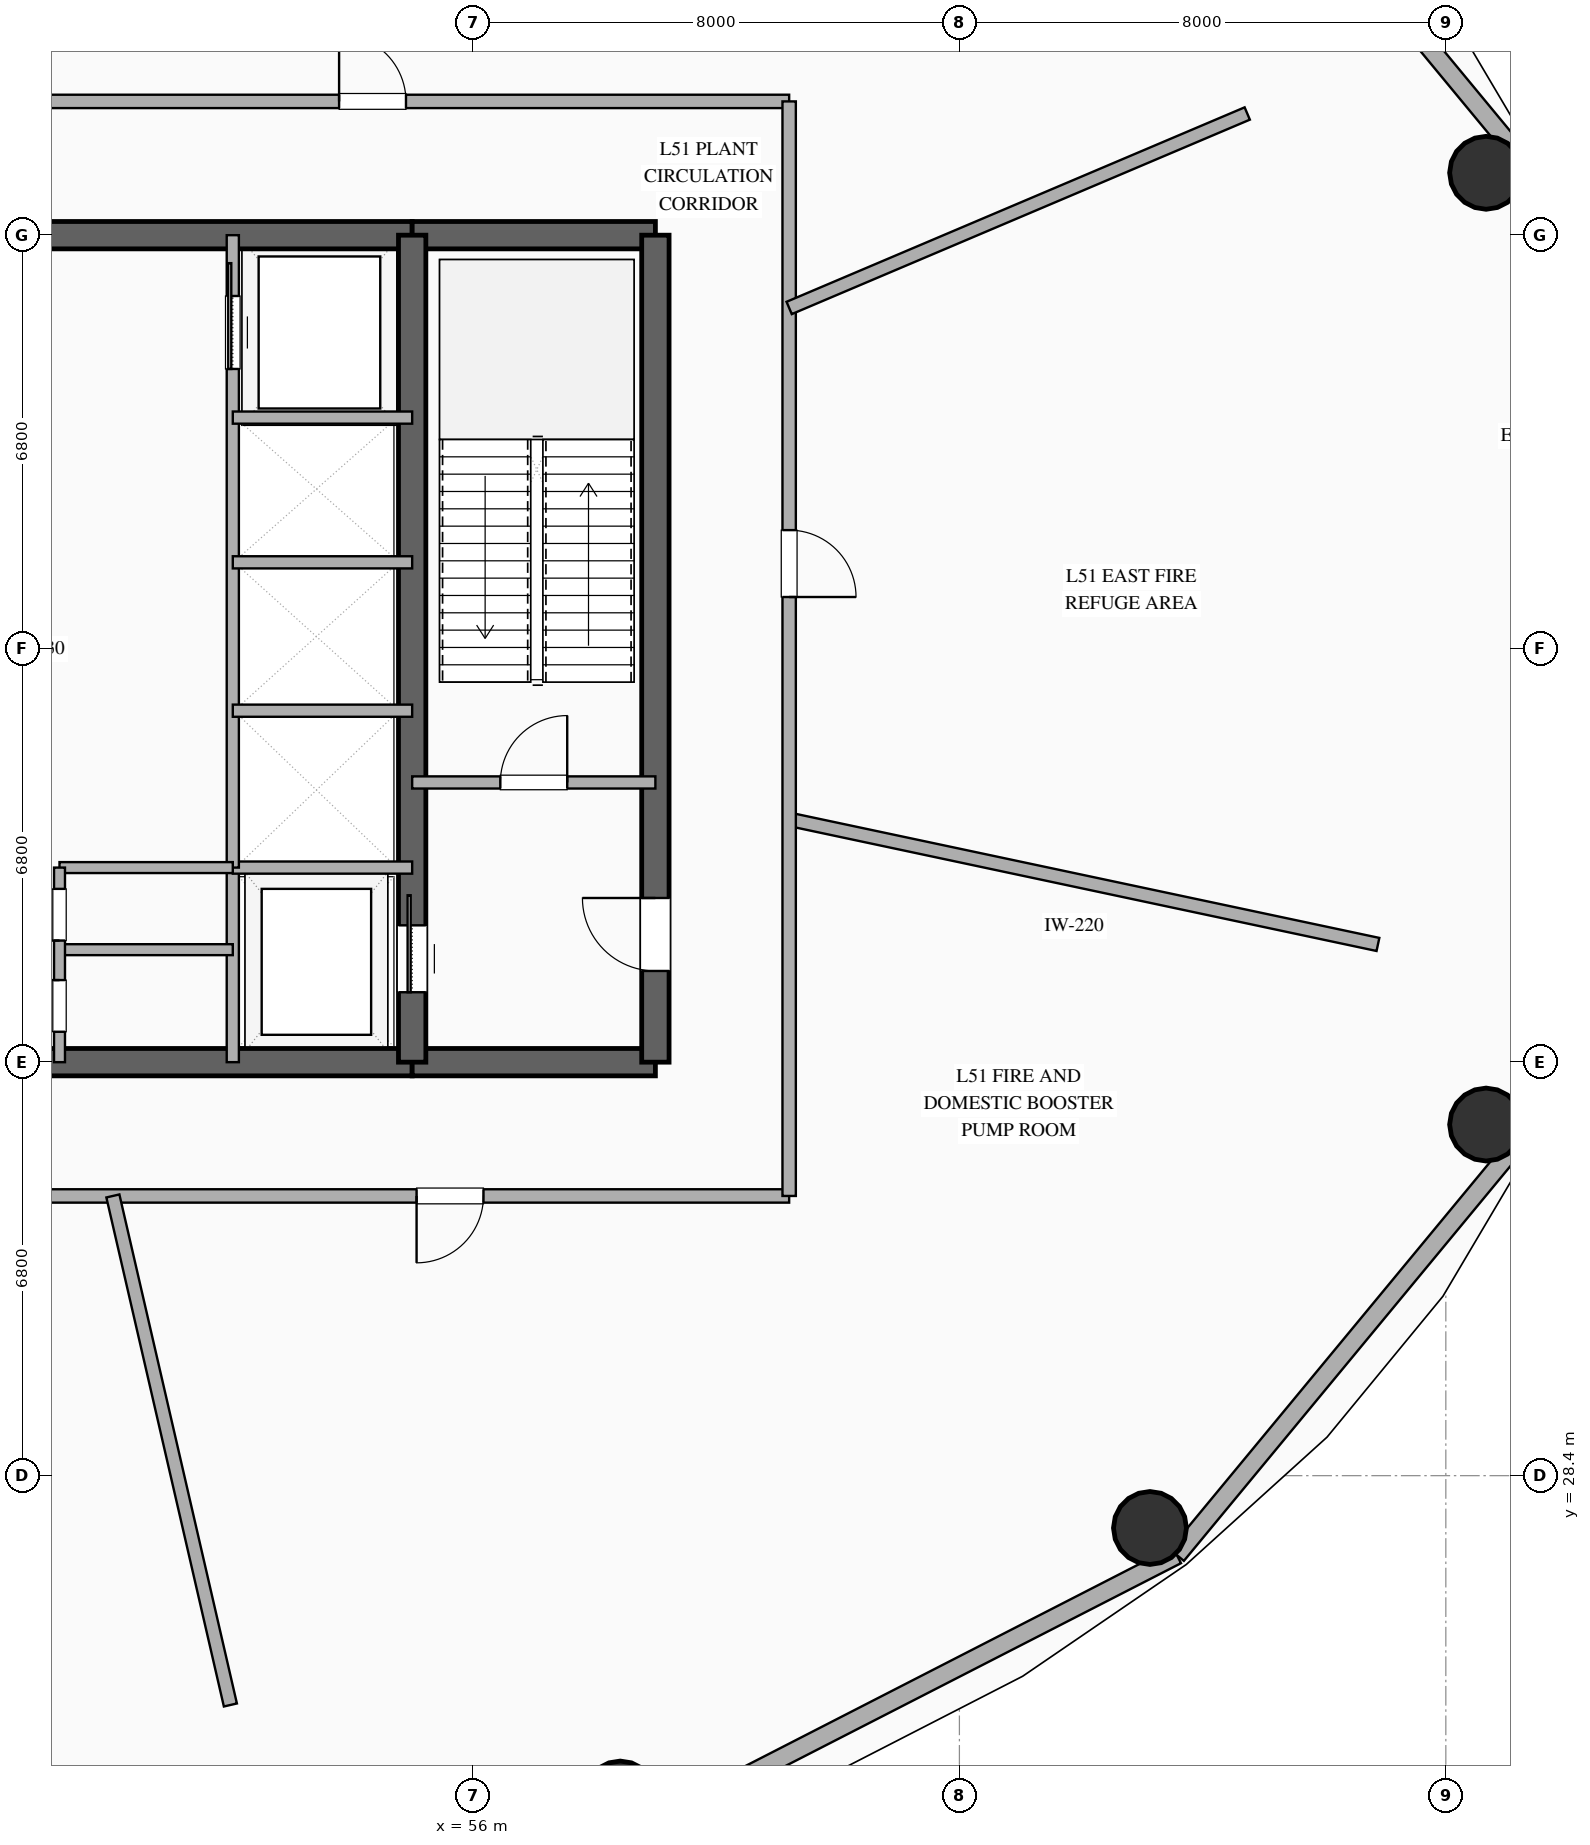
"""IFC4 building model, lengths in metres.
Left out: names, types, materials, properties, quantities, classifications, styles, units other than length and angle.
Written with IfcOpenShell. Run it as: python <this file> out.ifc"""

import sys

from ifc_helpers import new_model, si_unit, direction, frame, frame_2d, origin, origin_2d, place, context, subcontext, project, spatial, rectangle, hollow_circle, extrude, element, fill, save


model = new_model("IFC4")
c1 = context("Model", 3, precision=1e-05, world=origin(), true_north=direction((0.0, 1.0)))
c2 = subcontext(c1, "Body", "Model", "MODEL_VIEW")
j1 = project(units=[si_unit("LENGTHUNIT", "METRE"), si_unit("PLANEANGLEUNIT", "RADIAN")], contexts=[c1])
p1 = place(None, origin())
s1 = spatial("IfcSite", under=j1, at=p1, CompositionType="ELEMENT")
p2 = place(p1, origin())
s2 = spatial("IfcBuilding", under=s1, at=p2, CompositionType="ELEMENT")
p3 = place(p2, frame((0.0, 0.0, 201.0)))
s3 = spatial("IfcBuildingStorey", under=s2, at=p3, CompositionType="ELEMENT", Elevation=201.0)
p4 = place(p3, frame((41.0, 35.2, 0.0), z_axis=(0.0, 0.0, 1.0), x_axis=(1.0, 0.0, 0.0)))
e1 = element("IfcWall", 1, at=p4, inside=s3, PredefinedType="SHEAR", context=c2, shape_type="SweptSolid", body=[
    extrude(rectangle(XDim=14.0, YDim=0.45, at=frame_2d((7.0, 0.0))), origin(), (0.0, 0.0, 1.0), 5.15),
])
p5 = place(p4, frame((6.1, 0.0, 0.0)))
e2 = element("IfcOpeningElement", 2, at=p5, cuts=e1, PredefinedType="OPENING", context=c2, shape_type="SweptSolid", body=[
    extrude(rectangle(XDim=1.8, YDim=2.25, at=frame_2d((0.9, 1.125))), frame((0.0, 0.235, 0.0), z_axis=(0.0, -1.0, 0.0), x_axis=(1.0, 0.0, 0.0)), (0.0, 0.0, 1.0), 0.47),
])
p6 = place(p3, frame((55.0, 35.2, 0.0), z_axis=(0.0, 0.0, 1.0), x_axis=(1.0, 0.0, 0.0)))
e3 = element("IfcWall", 3, at=p6, inside=s3, PredefinedType="SHEAR", context=c2, shape_type="SweptSolid", body=[
    extrude(rectangle(XDim=4.0, YDim=0.45, at=frame_2d((2.0, 0.0))), origin(), (0.0, 0.0, 1.0), 5.15),
])
p7 = place(p3, frame((41.0, 48.8, 0.0), z_axis=(0.0, 0.0, 1.0), x_axis=(1.0, 0.0, 0.0)))
e4 = element("IfcWall", 4, at=p7, inside=s3, PredefinedType="SHEAR", context=c2, shape_type="SweptSolid", body=[
    extrude(rectangle(XDim=14.0, YDim=0.45, at=frame_2d((7.0, 0.0))), origin(), (0.0, 0.0, 1.0), 5.15),
])
p8 = place(p7, frame((6.1, 0.0, 0.0)))
e5 = element("IfcOpeningElement", 5, at=p8, cuts=e4, PredefinedType="OPENING", context=c2, shape_type="SweptSolid", body=[
    extrude(rectangle(XDim=1.8, YDim=2.25, at=frame_2d((0.9, 1.125))), frame((0.0, 0.235, 0.0), z_axis=(0.0, -1.0, 0.0), x_axis=(1.0, 0.0, 0.0)), (0.0, 0.0, 1.0), 0.47),
])
p9 = place(p3, frame((55.0, 48.8, 0.0), z_axis=(0.0, 0.0, 1.0), x_axis=(1.0, 0.0, 0.0)))
e6 = element("IfcWall", 6, at=p9, inside=s3, PredefinedType="SHEAR", context=c2, shape_type="SweptSolid", body=[
    extrude(rectangle(XDim=4.0, YDim=0.45, at=frame_2d((2.0, 0.0))), origin(), (0.0, 0.0, 1.0), 5.15),
])
p10 = place(p3, frame((59.0, 35.2, 0.0), z_axis=(0.0, 0.0, 1.0), x_axis=(0.0, 1.0, 0.0)))
e7 = element("IfcWall", 7, at=p10, inside=s3, PredefinedType="SHEAR", context=c2, shape_type="SweptSolid", body=[
    extrude(rectangle(XDim=13.6, YDim=0.45, at=frame_2d((6.8, 0.0))), origin(), (0.0, 0.0, 1.0), 5.15),
])
p11 = place(p10, frame((1.5, 0.0, 0.0)))
e8 = element("IfcOpeningElement", 8, at=p11, cuts=e7, PredefinedType="OPENING", context=c2, shape_type="SweptSolid", body=[
    extrude(rectangle(XDim=1.2, YDim=2.15, at=frame_2d((0.6, 1.075))), frame((0.0, 0.235, 0.0), z_axis=(0.0, -1.0, 0.0), x_axis=(1.0, 0.0, 0.0)), (0.0, 0.0, 1.0), 0.47),
])
p12 = place(p3, frame((55.0, 35.2, 0.0), z_axis=(0.0, 0.0, 1.0), x_axis=(0.0, 1.0, 0.0)))
e9 = element("IfcWall", 9, at=p12, inside=s3, PredefinedType="SHEAR", context=c2, shape_type="SweptSolid", body=[
    extrude(rectangle(XDim=13.6, YDim=0.45, at=frame_2d((6.8, 0.0))), origin(), (0.0, 0.0, 1.0), 5.15),
])
p13 = place(p12, frame((1.15, 0.0, 0.0)))
e10 = element("IfcOpeningElement", 10, at=p13, cuts=e9, PredefinedType="OPENING", context=c2, shape_type="SweptSolid", body=[
    extrude(rectangle(XDim=1.1, YDim=2.2, at=frame_2d((0.55, 1.1))), frame((0.0, 0.235, 0.0), z_axis=(0.0, -1.0, 0.0), x_axis=(1.0, 0.0, 0.0)), (0.0, 0.0, 1.0), 0.47),
])
for number, where, z_axis, x_axis in (
    (11, (72.662, 49.826, 0.0), (0.0, 0.0, 1.0), (1.0, 0.0, 0.0)),
    (12, (58.422, 23.107, 0.0), (0.0, 0.0, 1.0), (1.0, 0.0, 0.0)),
    (13, (67.134, 27.54, 0.0), (0.0, 0.0, 1.0), (1.0, 0.0, 0.0)),
    (14, (72.662, 34.174, 0.0), (0.0, 0.0, 1.0), (1.0, 0.0, 0.0)),
):
    element("IfcColumn", number, at=place(p3, frame(where, z_axis=z_axis, x_axis=x_axis)), inside=s3, PredefinedType="COLUMN", context=c2, shape_type="SweptSolid", body=[
        extrude(hollow_circle(Radius=0.6, WallThickness=0.032, at=origin_2d()), origin(), (0.0, 0.0, 1.0), 5.15),
    ])
p14 = place(p3, frame((73.232, 50.067, 0.0), z_axis=(0.0, 0.0, 1.0), x_axis=(-0.637333477683, 0.770588111915, 0.0)))
e15 = element("IfcWall", 15, at=p14, inside=s3, PredefinedType="SOLIDWALL", context=c2, shape_type="SweptSolid", body=[
    extrude(rectangle(XDim=8.875, YDim=0.3, at=frame_2d((4.438, 0.0))), origin(), (0.0, 0.0, 1.0), 5.15),
])
p15 = place(p3, frame((58.663, 22.525, 0.0), z_axis=(0.0, 0.0, 1.0), x_axis=(0.889872523182, 0.456209263919, 0.0)))
e16 = element("IfcWall", 16, at=p15, inside=s3, PredefinedType="SOLIDWALL", context=c2, shape_type="SweptSolid", body=[
    extrude(rectangle(XDim=10.016, YDim=0.3, at=frame_2d((5.008, 0.0))), origin(), (0.0, 0.0, 1.0), 5.15),
])
p16 = place(p3, frame((67.576, 27.094, 0.0), z_axis=(0.0, 0.0, 1.0), x_axis=(0.637333477683, 0.770588111915, 0.0)))
e17 = element("IfcWall", 17, at=p16, inside=s3, PredefinedType="SOLIDWALL", context=c2, shape_type="SweptSolid", body=[
    extrude(rectangle(XDim=8.875, YDim=0.3, at=frame_2d((4.438, 0.0))), origin(), (0.0, 0.0, 1.0), 5.15),
])
p17 = place(p3, frame((55.0, 39.8, 0.0), z_axis=(0.0, 0.0, 1.0), x_axis=(1.0, 0.0, 0.0)))
e18 = element("IfcWall", 18, at=p17, inside=s3, PredefinedType="SOLIDWALL", context=c2, shape_type="SweptSolid", body=[
    extrude(rectangle(XDim=4.0, YDim=0.2, at=frame_2d((2.0, 0.0))), origin(), (0.0, 0.0, 1.0), 3.45),
])
p18 = place(p17, frame((1.45, 0.0, 0.0)))
e19 = element("IfcOpeningElement", 19, at=p18, cuts=e18, PredefinedType="OPENING", context=c2, shape_type="SweptSolid", body=[
    extrude(rectangle(XDim=1.1, YDim=2.15, at=frame_2d((0.55, 1.075))), frame((0.0, 0.11, 0.0), z_axis=(0.0, -1.0, 0.0), x_axis=(1.0, 0.0, 0.0)), (0.0, 0.0, 1.0), 0.22),
])
p19 = place(p3, frame((52.05, 35.2, 0.0), z_axis=(0.0, 0.0, 1.0), x_axis=(0.0, 1.0, 0.0)))
e20 = element("IfcWall", 20, at=p19, inside=s3, PredefinedType="SOLIDWALL", context=c2, shape_type="SweptSolid", body=[
    extrude(rectangle(XDim=3.2, YDim=0.2, at=frame_2d((1.6, 0.0))), origin(), (0.0, 0.0, 1.0), 3.45),
])
p20 = place(p3, frame((52.05, 38.4, 0.0), z_axis=(0.0, 0.0, 1.0), x_axis=(1.0, 0.0, 0.0)))
e21 = element("IfcWall", 21, at=p20, inside=s3, PredefinedType="SOLIDWALL", context=c2, shape_type="SweptSolid", body=[
    extrude(rectangle(XDim=2.95, YDim=0.2, at=frame_2d((1.475, 0.0))), origin(), (0.0, 0.0, 1.0), 3.45),
])
p21 = place(p3, frame((52.05, 38.4, 0.0), z_axis=(0.0, 0.0, 1.0), x_axis=(0.0, 1.0, 0.0)))
e22 = element("IfcWall", 22, at=p21, inside=s3, PredefinedType="SOLIDWALL", context=c2, shape_type="SweptSolid", body=[
    extrude(rectangle(XDim=10.4, YDim=0.2, at=frame_2d((5.2, 0.0))), origin(), (0.0, 0.0, 1.0), 3.45),
])
p22 = place(p21, frame((8.2, 0.0, 0.0)))
e23 = element("IfcOpeningElement", 23, at=p22, cuts=e22, PredefinedType="OPENING", context=c2, shape_type="SweptSolid", body=[
    extrude(rectangle(XDim=1.2, YDim=2.2, at=frame_2d((0.6, 1.1))), frame((0.0, 0.11, 0.0), z_axis=(0.0, -1.0, 0.0), x_axis=(1.0, 0.0, 0.0)), (0.0, 0.0, 1.0), 0.22),
])
for number, where, z_axis, x_axis in (
    (24, (52.05, 40.98, 0.0), (0.0, 0.0, 1.0), (1.0, 0.0, 0.0)),
    (25, (52.05, 43.42, 0.0), (0.0, 0.0, 1.0), (1.0, 0.0, 0.0)),
    (26, (52.05, 45.8, 0.0), (0.0, 0.0, 1.0), (1.0, 0.0, 0.0)),
):
    element("IfcWall", number, at=place(p3, frame(where, z_axis=z_axis, x_axis=x_axis)), inside=s3, PredefinedType="SOLIDWALL", context=c2, shape_type="SweptSolid", body=[
        extrude(rectangle(XDim=2.95, YDim=0.2, at=frame_2d((1.475, 0.0))), origin(), (0.0, 0.0, 1.0), 3.45),
    ])
for number, where, z_axis, x_axis in (
    (27, (49.2, 37.05, 0.0), (0.0, 0.0, 1.0), (1.0, 0.0, 0.0)),
    (28, (49.2, 38.4, 0.0), (0.0, 0.0, 1.0), (1.0, 0.0, 0.0)),
):
    element("IfcWall", number, at=place(p3, frame(where, z_axis=z_axis, x_axis=x_axis)), inside=s3, PredefinedType="PLUMBINGWALL", context=c2, shape_type="SweptSolid", body=[
        extrude(rectangle(XDim=2.85, YDim=0.18, at=frame_2d((1.425, 0.0))), origin(), (0.0, 0.0, 1.0), 3.45),
    ])
p23 = place(p3, frame((49.2, 35.2, 0.0), z_axis=(0.0, 0.0, 1.0), x_axis=(0.0, 1.0, 0.0)))
e29 = element("IfcWall", 29, at=p23, inside=s3, PredefinedType="PLUMBINGWALL", context=c2, shape_type="SweptSolid", body=[
    extrude(rectangle(XDim=3.2, YDim=0.18, at=frame_2d((1.6, 0.0))), origin(), (0.0, 0.0, 1.0), 3.45),
])
p24 = place(p23, frame((0.5, 0.0, 0.0)))
e30 = element("IfcOpeningElement", 30, at=p24, cuts=e29, PredefinedType="OPENING", context=c2, shape_type="SweptSolid", body=[
    extrude(rectangle(XDim=0.85, YDim=2.1, at=frame_2d((0.425, 1.05))), frame((0.0, 0.1, 0.0), z_axis=(0.0, -1.0, 0.0), x_axis=(1.0, 0.0, 0.0)), (0.0, 0.0, 1.0), 0.2),
])
p25 = place(p23, frame((2.0, 0.0, 0.0)))
e31 = element("IfcOpeningElement", 31, at=p25, cuts=e29, PredefinedType="OPENING", context=c2, shape_type="SweptSolid", body=[
    extrude(rectangle(XDim=0.85, YDim=2.15, at=frame_2d((0.425, 1.075))), frame((0.0, 0.1, 0.0), z_axis=(0.0, -1.0, 0.0), x_axis=(1.0, 0.0, 0.0)), (0.0, 0.0, 1.0), 0.2),
])
p26 = place(p3, frame((61.2, 33.0, 0.0), z_axis=(0.0, 0.0, 1.0), x_axis=(-1.0, 0.0, 0.0)))
e32 = element("IfcWall", 32, at=p26, inside=s3, PredefinedType="SOLIDWALL", context=c2, shape_type="SweptSolid", body=[
    extrude(rectangle(XDim=26.4, YDim=0.22, at=frame_2d((13.2, 0.0))), origin(), (0.0, 0.0, 1.0), 3.45),
])
p27 = place(p26, frame((18.195, 0.0, 0.0)))
e33 = element("IfcOpeningElement", 33, at=p27, cuts=e32, PredefinedType="OPENING", context=c2, shape_type="SweptSolid", body=[
    extrude(rectangle(XDim=1.1, YDim=2.15, at=frame_2d((0.55, 1.075))), frame((0.0, 0.12, 0.0), z_axis=(0.0, -1.0, 0.0), x_axis=(1.0, 0.0, 0.0)), (0.0, 0.0, 1.0), 0.24),
])
p28 = place(p26, frame((5.028, 0.0, 0.0)))
e34 = element("IfcOpeningElement", 34, at=p28, cuts=e32, PredefinedType="OPENING", context=c2, shape_type="SweptSolid", body=[
    extrude(rectangle(XDim=1.1, YDim=2.15, at=frame_2d((0.55, 1.075))), frame((0.0, 0.12, 0.0), z_axis=(0.0, -1.0, 0.0), x_axis=(1.0, 0.0, 0.0)), (0.0, 0.0, 1.0), 0.24),
])
p29 = place(p3, frame((34.8, 51.0, 0.0), z_axis=(0.0, 0.0, 1.0), x_axis=(1.0, 0.0, 0.0)))
e35 = element("IfcWall", 35, at=p29, inside=s3, PredefinedType="SOLIDWALL", context=c2, shape_type="SweptSolid", body=[
    extrude(rectangle(XDim=26.4, YDim=0.22, at=frame_2d((13.2, 0.0))), origin(), (0.0, 0.0, 1.0), 3.45),
])
p30 = place(p29, frame((18.998, 0.0, 0.0)))
e36 = element("IfcOpeningElement", 36, at=p30, cuts=e35, PredefinedType="OPENING", context=c2, shape_type="SweptSolid", body=[
    extrude(rectangle(XDim=1.1, YDim=2.15, at=frame_2d((0.55, 1.075))), frame((0.0, 0.12, 0.0), z_axis=(0.0, -1.0, 0.0), x_axis=(1.0, 0.0, 0.0)), (0.0, 0.0, 1.0), 0.24),
])
p31 = place(p29, frame((5.83, 0.0, 0.0)))
e37 = element("IfcOpeningElement", 37, at=p31, cuts=e35, PredefinedType="OPENING", context=c2, shape_type="SweptSolid", body=[
    extrude(rectangle(XDim=1.1, YDim=2.15, at=frame_2d((0.55, 1.075))), frame((0.0, 0.12, 0.0), z_axis=(0.0, -1.0, 0.0), x_axis=(1.0, 0.0, 0.0)), (0.0, 0.0, 1.0), 0.24),
])
p32 = place(p3, frame((70.883, 37.136, 0.0), z_axis=(0.0, 0.0, 1.0), x_axis=(-0.978145749557, 0.207920399731, 0.0)))
e38 = element("IfcWall", 38, at=p32, inside=s3, PredefinedType="SOLIDWALL", context=c2, shape_type="SweptSolid", body=[
    extrude(rectangle(XDim=9.9, YDim=0.22, at=frame_2d((4.95, 0.0))), origin(), (0.0, 0.0, 1.0), 3.45),
])
p33 = place(p3, frame((50.078, 33.0, 0.0), z_axis=(0.0, 0.0, 1.0), x_axis=(0.224950824014, -0.974370117961, 0.0)))
e39 = element("IfcWall", 39, at=p33, inside=s3, PredefinedType="SOLIDWALL", context=c2, shape_type="SweptSolid", body=[
    extrude(rectangle(XDim=8.591, YDim=0.22, at=frame_2d((4.296, 0.0))), origin(), (0.0, 0.0, 1.0), 3.45),
])
p34 = place(p3, frame((61.2, 51.0, 0.0), z_axis=(0.0, 0.0, 1.0), x_axis=(0.0, -1.0, 0.0)))
e40 = element("IfcWall", 40, at=p34, inside=s3, PredefinedType="SOLIDWALL", context=c2, shape_type="SweptSolid", body=[
    extrude(rectangle(XDim=18.0, YDim=0.22, at=frame_2d((9.0, 0.0))), origin(), (0.0, 0.0, 1.0), 3.45),
])
p35 = place(p34, frame((7.05, 0.0, 0.0)))
e41 = element("IfcOpeningElement", 41, at=p35, cuts=e40, PredefinedType="OPENING", context=c2, shape_type="SweptSolid", body=[
    extrude(rectangle(XDim=1.1, YDim=2.15, at=frame_2d((0.55, 1.075))), frame((0.0, 0.12, 0.0), z_axis=(0.0, -1.0, 0.0), x_axis=(1.0, 0.0, 0.0)), (0.0, 0.0, 1.0), 0.24),
])
p36 = place(p3, frame((61.2, 47.603, 0.0), z_axis=(0.0, 0.0, 1.0), x_axis=(0.920503441048, 0.390734455889, 0.0)))
e42 = element("IfcWall", 42, at=p36, inside=s3, PredefinedType="SOLIDWALL", context=c2, shape_type="SweptSolid", body=[
    extrude(rectangle(XDim=8.185, YDim=0.22, at=frame_2d((4.092, 0.0))), origin(), (0.0, 0.0, 1.0), 3.45),
])
p37 = place(p13, origin())
e43 = element("IfcDoor", 43, at=p37, inside=s3, OperationType="SLIDING_TO_RIGHT", PredefinedType="DOOR", context=c2, shape_type="SweptSolid", body=[
    extrude(rectangle(XDim=1.1, YDim=2.2, at=frame_2d((0.55, 1.1))), frame((0.0, 0.025, 0.0), z_axis=(0.0, -1.0, 0.0), x_axis=(1.0, 0.0, 0.0)), (0.0, 0.0, 1.0), 0.05),
])
fill(e10, e43)
p38 = place(p11, origin())
e44 = element("IfcDoor", 44, at=p38, inside=s3, OperationType="SINGLE_SWING_RIGHT", PredefinedType="DOOR", context=c2, shape_type="SweptSolid", body=[
    extrude(rectangle(XDim=1.2, YDim=2.15, at=frame_2d((0.6, 1.075))), frame((0.0, 0.025, 0.0), z_axis=(0.0, -1.0, 0.0), x_axis=(1.0, 0.0, 0.0)), (0.0, 0.0, 1.0), 0.05),
])
fill(e8, e44)
p39 = place(p18, origin())
e45 = element("IfcDoor", 45, at=p39, inside=s3, OperationType="SINGLE_SWING_RIGHT", PredefinedType="DOOR", context=c2, shape_type="SweptSolid", body=[
    extrude(rectangle(XDim=1.1, YDim=2.15, at=frame_2d((0.55, 1.075))), frame((0.0, 0.025, 0.0), z_axis=(0.0, -1.0, 0.0), x_axis=(1.0, 0.0, 0.0)), (0.0, 0.0, 1.0), 0.05),
])
fill(e19, e45)
p40 = place(p22, origin())
e46 = element("IfcDoor", 46, at=p40, inside=s3, OperationType="SLIDING_TO_RIGHT", PredefinedType="DOOR", context=c2, shape_type="SweptSolid", body=[
    extrude(rectangle(XDim=1.2, YDim=2.2, at=frame_2d((0.6, 1.1))), frame((0.0, 0.025, 0.0), z_axis=(0.0, -1.0, 0.0), x_axis=(1.0, 0.0, 0.0)), (0.0, 0.0, 1.0), 0.05),
])
fill(e23, e46)
p41 = place(p24, origin())
e47 = element("IfcDoor", 47, at=p41, inside=s3, OperationType="SINGLE_SWING_RIGHT", PredefinedType="DOOR", context=c2, shape_type="SweptSolid", body=[
    extrude(rectangle(XDim=0.85, YDim=2.1, at=frame_2d((0.425, 1.05))), frame((0.0, 0.025, 0.0), z_axis=(0.0, -1.0, 0.0), x_axis=(1.0, 0.0, 0.0)), (0.0, 0.0, 1.0), 0.05),
])
fill(e30, e47)
p42 = place(p25, origin())
e48 = element("IfcDoor", 48, at=p42, inside=s3, OperationType="SINGLE_SWING_LEFT", PredefinedType="DOOR", context=c2, shape_type="SweptSolid", body=[
    extrude(rectangle(XDim=0.85, YDim=2.15, at=frame_2d((0.425, 1.075))), frame((0.0, 0.025, 0.0), z_axis=(0.0, -1.0, 0.0), x_axis=(1.0, 0.0, 0.0)), (0.0, 0.0, 1.0), 0.05),
])
fill(e31, e48)
p43 = place(p28, origin())
e49 = element("IfcDoor", 49, at=p43, inside=s3, OperationType="SINGLE_SWING_RIGHT", PredefinedType="DOOR", context=c2, shape_type="SweptSolid", body=[
    extrude(rectangle(XDim=1.1, YDim=2.15, at=frame_2d((0.55, 1.075))), frame((0.0, 0.025, 0.0), z_axis=(0.0, -1.0, 0.0), x_axis=(1.0, 0.0, 0.0)), (0.0, 0.0, 1.0), 0.05),
])
fill(e34, e49)
p44 = place(p30, origin())
e50 = element("IfcDoor", 50, at=p44, inside=s3, OperationType="SINGLE_SWING_LEFT", PredefinedType="DOOR", context=c2, shape_type="SweptSolid", body=[
    extrude(rectangle(XDim=1.1, YDim=2.15, at=frame_2d((0.55, 1.075))), frame((0.0, 0.025, 0.0), z_axis=(0.0, -1.0, 0.0), x_axis=(1.0, 0.0, 0.0)), (0.0, 0.0, 1.0), 0.05),
])
fill(e36, e50)
p45 = place(p35, origin())
e51 = element("IfcDoor", 51, at=p45, inside=s3, OperationType="SINGLE_SWING_RIGHT", PredefinedType="DOOR", context=c2, shape_type="SweptSolid", body=[
    extrude(rectangle(XDim=1.1, YDim=2.15, at=frame_2d((0.55, 1.075))), frame((0.0, 0.025, 0.0), z_axis=(0.0, -1.0, 0.0), x_axis=(1.0, 0.0, 0.0)), (0.0, 0.0, 1.0), 0.05),
])
fill(e41, e51)
save(model, sys.argv[1])
